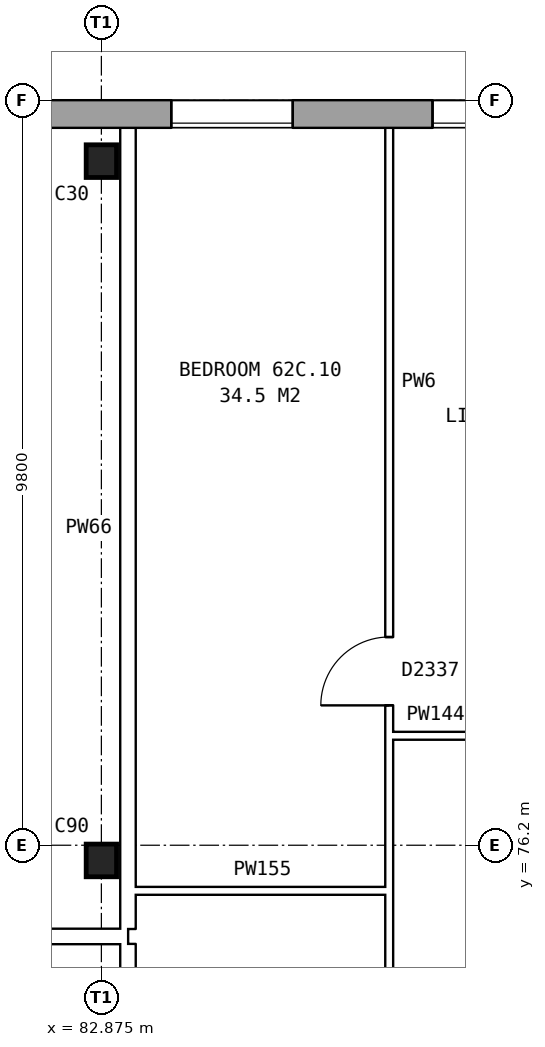
"""IFC4 building model, lengths in metres.
Left out: names, types, materials, properties, quantities, classifications, styles, units other than length and angle.
Written with IfcOpenShell. Run it as: python <this file> out.ifc"""

import sys

from ifc_helpers import new_model, si_unit, direction, frame, frame_2d, origin, origin_2d, place, context, subcontext, project, spatial, rectangle, i_section, extrude, element, fill, save


model = new_model("IFC4")
c1 = context("Model", 3, precision=1e-05, world=origin(), true_north=direction((0.0, 1.0)))
c2 = subcontext(c1, "Body", "Model", "MODEL_VIEW")
j1 = project(units=[si_unit("LENGTHUNIT", "METRE"), si_unit("PLANEANGLEUNIT", "RADIAN")], contexts=[c1])
p1 = place(None, origin())
s1 = spatial("IfcSite", under=j1, at=p1, CompositionType="ELEMENT")
p2 = place(p1, origin())
s2 = spatial("IfcBuilding", under=s1, at=p2, CompositionType="ELEMENT")
p3 = place(p2, frame((0.0, 0.0, 221.4)))
s3 = spatial("IfcBuildingStorey", under=s2, at=p3, CompositionType="ELEMENT", Elevation=221.4)
for number, where, z_axis, x_axis in (
    (1, (82.875, 76.0, 0.0), (0.0, 0.0, 1.0), (1.0, 0.0, 0.0)),
    (2, (82.875, 85.2, 0.0), (0.0, 0.0, 1.0), (1.0, 0.0, 0.0)),
):
    element("IfcColumn", number, at=place(p3, frame(where, z_axis=z_axis, x_axis=x_axis)), inside=s3, PredefinedType="COLUMN", context=c2, shape_type="SweptSolid", body=[
        extrude(i_section(OverallWidth=0.4, OverallDepth=0.43, WebThickness=0.04, FlangeThickness=0.04, at=origin_2d()), origin(), (0.0, 0.0, 1.0), 2.85),
    ])
p4 = place(p3, frame((131.05, 85.82, 0.0), z_axis=(0.0, 0.0, 1.0), x_axis=(-1.0, 0.0, 0.0)))
e3 = element("IfcWall", 3, at=p4, inside=s3, PredefinedType="STANDARD", context=c2, shape_type="SweptSolid", body=[
    extrude(rectangle(XDim=55.1, YDim=0.36, at=frame_2d((27.55, 0.0))), origin(), (0.0, 0.0, 1.0), 2.85),
])
p5 = place(p4, frame((0.969, 0.0, 0.8)))
e4 = element("IfcOpeningElement", 4, at=p5, cuts=e3, PredefinedType="OPENING", context=c2, shape_type="SweptSolid", body=[
    extrude(rectangle(XDim=1.6, YDim=1.8, at=frame_2d((0.8, 0.9))), frame((0.0, 0.19, 0.0), z_axis=(0.0, -1.0, 0.0), x_axis=(1.0, 0.0, 0.0)), (0.0, 0.0, 1.0), 0.38),
])
p6 = place(p4, frame((4.406, 0.0, 0.8)))
e5 = element("IfcOpeningElement", 5, at=p6, cuts=e3, PredefinedType="OPENING", context=c2, shape_type="SweptSolid", body=[
    extrude(rectangle(XDim=1.6, YDim=1.8, at=frame_2d((0.8, 0.9))), frame((0.0, 0.19, 0.0), z_axis=(0.0, -1.0, 0.0), x_axis=(1.0, 0.0, 0.0)), (0.0, 0.0, 1.0), 0.38),
])
p7 = place(p4, frame((7.844, 0.0, 0.8)))
e6 = element("IfcOpeningElement", 6, at=p7, cuts=e3, PredefinedType="OPENING", context=c2, shape_type="SweptSolid", body=[
    extrude(rectangle(XDim=1.6, YDim=1.8, at=frame_2d((0.8, 0.9))), frame((0.0, 0.19, 0.0), z_axis=(0.0, -1.0, 0.0), x_axis=(1.0, 0.0, 0.0)), (0.0, 0.0, 1.0), 0.38),
])
p8 = place(p4, frame((11.281, 0.0, 0.8)))
e7 = element("IfcOpeningElement", 7, at=p8, cuts=e3, PredefinedType="OPENING", context=c2, shape_type="SweptSolid", body=[
    extrude(rectangle(XDim=1.6, YDim=1.8, at=frame_2d((0.8, 0.9))), frame((0.0, 0.19, 0.0), z_axis=(0.0, -1.0, 0.0), x_axis=(1.0, 0.0, 0.0)), (0.0, 0.0, 1.0), 0.38),
])
p9 = place(p4, frame((14.719, 0.0, 0.8)))
e8 = element("IfcOpeningElement", 8, at=p9, cuts=e3, PredefinedType="OPENING", context=c2, shape_type="SweptSolid", body=[
    extrude(rectangle(XDim=1.6, YDim=1.8, at=frame_2d((0.8, 0.9))), frame((0.0, 0.19, 0.0), z_axis=(0.0, -1.0, 0.0), x_axis=(1.0, 0.0, 0.0)), (0.0, 0.0, 1.0), 0.38),
])
p10 = place(p4, frame((18.156, 0.0, 0.8)))
e9 = element("IfcOpeningElement", 9, at=p10, cuts=e3, PredefinedType="OPENING", context=c2, shape_type="SweptSolid", body=[
    extrude(rectangle(XDim=1.6, YDim=1.8, at=frame_2d((0.8, 0.9))), frame((0.0, 0.19, 0.0), z_axis=(0.0, -1.0, 0.0), x_axis=(1.0, 0.0, 0.0)), (0.0, 0.0, 1.0), 0.38),
])
p11 = place(p4, frame((21.594, 0.0, 0.8)))
e10 = element("IfcOpeningElement", 10, at=p11, cuts=e3, PredefinedType="OPENING", context=c2, shape_type="SweptSolid", body=[
    extrude(rectangle(XDim=1.6, YDim=1.8, at=frame_2d((0.8, 0.9))), frame((0.0, 0.19, 0.0), z_axis=(0.0, -1.0, 0.0), x_axis=(1.0, 0.0, 0.0)), (0.0, 0.0, 1.0), 0.38),
])
p12 = place(p4, frame((25.031, 0.0, 0.8)))
e11 = element("IfcOpeningElement", 11, at=p12, cuts=e3, PredefinedType="OPENING", context=c2, shape_type="SweptSolid", body=[
    extrude(rectangle(XDim=1.6, YDim=1.8, at=frame_2d((0.8, 0.9))), frame((0.0, 0.19, 0.0), z_axis=(0.0, -1.0, 0.0), x_axis=(1.0, 0.0, 0.0)), (0.0, 0.0, 1.0), 0.38),
])
p13 = place(p4, frame((28.469, 0.0, 0.8)))
e12 = element("IfcOpeningElement", 12, at=p13, cuts=e3, PredefinedType="OPENING", context=c2, shape_type="SweptSolid", body=[
    extrude(rectangle(XDim=1.6, YDim=1.8, at=frame_2d((0.8, 0.9))), frame((0.0, 0.19, 0.0), z_axis=(0.0, -1.0, 0.0), x_axis=(1.0, 0.0, 0.0)), (0.0, 0.0, 1.0), 0.38),
])
p14 = place(p4, frame((31.906, 0.0, 0.8)))
e13 = element("IfcOpeningElement", 13, at=p14, cuts=e3, PredefinedType="OPENING", context=c2, shape_type="SweptSolid", body=[
    extrude(rectangle(XDim=1.6, YDim=1.8, at=frame_2d((0.8, 0.9))), frame((0.0, 0.19, 0.0), z_axis=(0.0, -1.0, 0.0), x_axis=(1.0, 0.0, 0.0)), (0.0, 0.0, 1.0), 0.38),
])
p15 = place(p4, frame((35.344, 0.0, 0.8)))
e14 = element("IfcOpeningElement", 14, at=p15, cuts=e3, PredefinedType="OPENING", context=c2, shape_type="SweptSolid", body=[
    extrude(rectangle(XDim=1.6, YDim=1.8, at=frame_2d((0.8, 0.9))), frame((0.0, 0.19, 0.0), z_axis=(0.0, -1.0, 0.0), x_axis=(1.0, 0.0, 0.0)), (0.0, 0.0, 1.0), 0.38),
])
p16 = place(p4, frame((38.781, 0.0, 0.8)))
e15 = element("IfcOpeningElement", 15, at=p16, cuts=e3, PredefinedType="OPENING", context=c2, shape_type="SweptSolid", body=[
    extrude(rectangle(XDim=1.6, YDim=1.8, at=frame_2d((0.8, 0.9))), frame((0.0, 0.19, 0.0), z_axis=(0.0, -1.0, 0.0), x_axis=(1.0, 0.0, 0.0)), (0.0, 0.0, 1.0), 0.38),
])
p17 = place(p4, frame((42.219, 0.0, 0.8)))
e16 = element("IfcOpeningElement", 16, at=p17, cuts=e3, PredefinedType="OPENING", context=c2, shape_type="SweptSolid", body=[
    extrude(rectangle(XDim=1.6, YDim=1.8, at=frame_2d((0.8, 0.9))), frame((0.0, 0.19, 0.0), z_axis=(0.0, -1.0, 0.0), x_axis=(1.0, 0.0, 0.0)), (0.0, 0.0, 1.0), 0.38),
])
p18 = place(p4, frame((45.656, 0.0, 0.8)))
e17 = element("IfcOpeningElement", 17, at=p18, cuts=e3, PredefinedType="OPENING", context=c2, shape_type="SweptSolid", body=[
    extrude(rectangle(XDim=1.6, YDim=1.8, at=frame_2d((0.8, 0.9))), frame((0.0, 0.19, 0.0), z_axis=(0.0, -1.0, 0.0), x_axis=(1.0, 0.0, 0.0)), (0.0, 0.0, 1.0), 0.38),
])
p19 = place(p4, frame((49.094, 0.0, 0.8)))
e18 = element("IfcOpeningElement", 18, at=p19, cuts=e3, PredefinedType="OPENING", context=c2, shape_type="SweptSolid", body=[
    extrude(rectangle(XDim=1.6, YDim=1.8, at=frame_2d((0.8, 0.9))), frame((0.0, 0.19, 0.0), z_axis=(0.0, -1.0, 0.0), x_axis=(1.0, 0.0, 0.0)), (0.0, 0.0, 1.0), 0.38),
])
p20 = place(p4, frame((52.531, 0.0, 0.8)))
e19 = element("IfcOpeningElement", 19, at=p20, cuts=e3, PredefinedType="OPENING", context=c2, shape_type="SweptSolid", body=[
    extrude(rectangle(XDim=1.6, YDim=1.8, at=frame_2d((0.8, 0.9))), frame((0.0, 0.19, 0.0), z_axis=(0.0, -1.0, 0.0), x_axis=(1.0, 0.0, 0.0)), (0.0, 0.0, 1.0), 0.38),
])
p21 = place(p3, frame((75.64, 75.0, 0.0), z_axis=(0.0, 0.0, 1.0), x_axis=(1.0, 0.0, 0.0)))
e20 = element("IfcWall", 20, at=p21, inside=s3, PredefinedType="PARTITIONING", context=c2, shape_type="SweptSolid", body=[
    extrude(rectangle(XDim=7.585, YDim=0.2, at=frame_2d((3.792, 0.0))), origin(), (0.0, 0.0, 1.0), 2.85),
])
p22 = place(p21, frame((3.343, 0.0, 0.0)))
e21 = element("IfcOpeningElement", 21, at=p22, cuts=e20, PredefinedType="OPENING", context=c2, shape_type="SweptSolid", body=[
    extrude(rectangle(XDim=0.9, YDim=2.1, at=frame_2d((0.45, 1.05))), frame((0.0, 0.11, 0.0), z_axis=(0.0, -1.0, 0.0), x_axis=(1.0, 0.0, 0.0)), (0.0, 0.0, 1.0), 0.22),
])
p23 = place(p3, frame((83.325, 75.6, 0.0), z_axis=(0.0, 0.0, 1.0), x_axis=(1.0, 0.0, 0.0)))
e22 = element("IfcWall", 22, at=p23, inside=s3, PredefinedType="PARTITIONING", context=c2, shape_type="SweptSolid", body=[
    extrude(rectangle(XDim=3.337, YDim=0.1, at=frame_2d((1.668, 0.0))), origin(), (0.0, 0.0, 1.0), 2.85),
])
p24 = place(p3, frame((86.662, 77.64, 0.0), z_axis=(0.0, 0.0, 1.0), x_axis=(1.0, 0.0, 0.0)))
e23 = element("IfcWall", 23, at=p24, inside=s3, PredefinedType="PARTITIONING", context=c2, shape_type="SweptSolid", body=[
    extrude(rectangle(XDim=3.338, YDim=0.1, at=frame_2d((1.669, 0.0))), origin(), (0.0, 0.0, 1.0), 2.85),
])
p25 = place(p24, frame((1.219, 0.0, 0.0)))
e24 = element("IfcOpeningElement", 24, at=p25, cuts=e23, PredefinedType="OPENING", context=c2, shape_type="SweptSolid", body=[
    extrude(rectangle(XDim=0.9, YDim=2.1, at=frame_2d((0.45, 1.05))), frame((0.0, 0.06, 0.0), z_axis=(0.0, -1.0, 0.0), x_axis=(1.0, 0.0, 0.0)), (0.0, 0.0, 1.0), 0.12),
])
p26 = place(p3, frame((83.225, 71.3, 0.0), z_axis=(0.0, 0.0, 1.0), x_axis=(0.0, 1.0, 0.0)))
e25 = element("IfcWall", 25, at=p26, inside=s3, PredefinedType="PARTITIONING", context=c2, shape_type="SweptSolid", body=[
    extrude(rectangle(XDim=3.6, YDim=0.2, at=frame_2d((1.8, 0.0))), origin(), (0.0, 0.0, 1.0), 2.85),
])
p27 = place(p3, frame((83.225, 75.1, 0.0), z_axis=(0.0, 0.0, 1.0), x_axis=(0.0, 1.0, 0.0)))
e26 = element("IfcWall", 26, at=p27, inside=s3, PredefinedType="PARTITIONING", context=c2, shape_type="SweptSolid", body=[
    extrude(rectangle(XDim=10.54, YDim=0.2, at=frame_2d((5.27, 0.0))), origin(), (0.0, 0.0, 1.0), 2.85),
])
p28 = place(p3, frame((86.662, 71.3, 0.0), z_axis=(0.0, 0.0, 1.0), x_axis=(0.0, 1.0, 0.0)))
e27 = element("IfcWall", 27, at=p28, inside=s3, PredefinedType="PARTITIONING", context=c2, shape_type="SweptSolid", body=[
    extrude(rectangle(XDim=14.34, YDim=0.1, at=frame_2d((7.17, 0.0))), origin(), (0.0, 0.0, 1.0), 2.85),
])
p29 = place(p28, frame((6.74, 0.0, 0.0)))
e28 = element("IfcOpeningElement", 28, at=p29, cuts=e27, PredefinedType="OPENING", context=c2, shape_type="SweptSolid", body=[
    extrude(rectangle(XDim=0.9, YDim=2.1, at=frame_2d((0.45, 1.05))), frame((0.0, 0.06, 0.0), z_axis=(0.0, -1.0, 0.0), x_axis=(1.0, 0.0, 0.0)), (0.0, 0.0, 1.0), 0.12),
])
p30 = place(p28, frame((0.4, 0.0, 0.0)))
e29 = element("IfcOpeningElement", 29, at=p30, cuts=e27, PredefinedType="OPENING", context=c2, shape_type="SweptSolid", body=[
    extrude(rectangle(XDim=0.9, YDim=2.1, at=frame_2d((0.45, 1.05))), frame((0.0, 0.06, 0.0), z_axis=(0.0, -1.0, 0.0), x_axis=(1.0, 0.0, 0.0)), (0.0, 0.0, 1.0), 0.12),
])
p31 = place(p17, origin())
e30 = element("IfcWindow", 30, at=p31, inside=s3, PartitioningType="SINGLE_PANEL", PredefinedType="WINDOW", context=c2, shape_type="SweptSolid", body=[
    extrude(rectangle(XDim=1.6, YDim=1.8, at=frame_2d((0.8, 0.9))), frame((0.0, 0.15, 0.0), z_axis=(0.0, -1.0, 0.0), x_axis=(1.0, 0.0, 0.0)), (0.0, 0.0, 1.0), 0.06),
])
fill(e16, e30)
p32 = place(p18, origin())
e31 = element("IfcWindow", 31, at=p32, inside=s3, PartitioningType="SINGLE_PANEL", PredefinedType="WINDOW", context=c2, shape_type="SweptSolid", body=[
    extrude(rectangle(XDim=1.6, YDim=1.8, at=frame_2d((0.8, 0.9))), frame((0.0, 0.15, 0.0), z_axis=(0.0, -1.0, 0.0), x_axis=(1.0, 0.0, 0.0)), (0.0, 0.0, 1.0), 0.06),
])
fill(e17, e31)
p33 = place(p29, origin())
e32 = element("IfcDoor", 32, at=p33, inside=s3, OperationType="SINGLE_SWING_LEFT", PredefinedType="DOOR", context=c2, shape_type="SweptSolid", body=[
    extrude(rectangle(XDim=0.9, YDim=2.1, at=frame_2d((0.45, 1.05))), frame((0.0, 0.025, 0.0), z_axis=(0.0, -1.0, 0.0), x_axis=(1.0, 0.0, 0.0)), (0.0, 0.0, 1.0), 0.05),
])
fill(e28, e32)
save(model, sys.argv[1])
